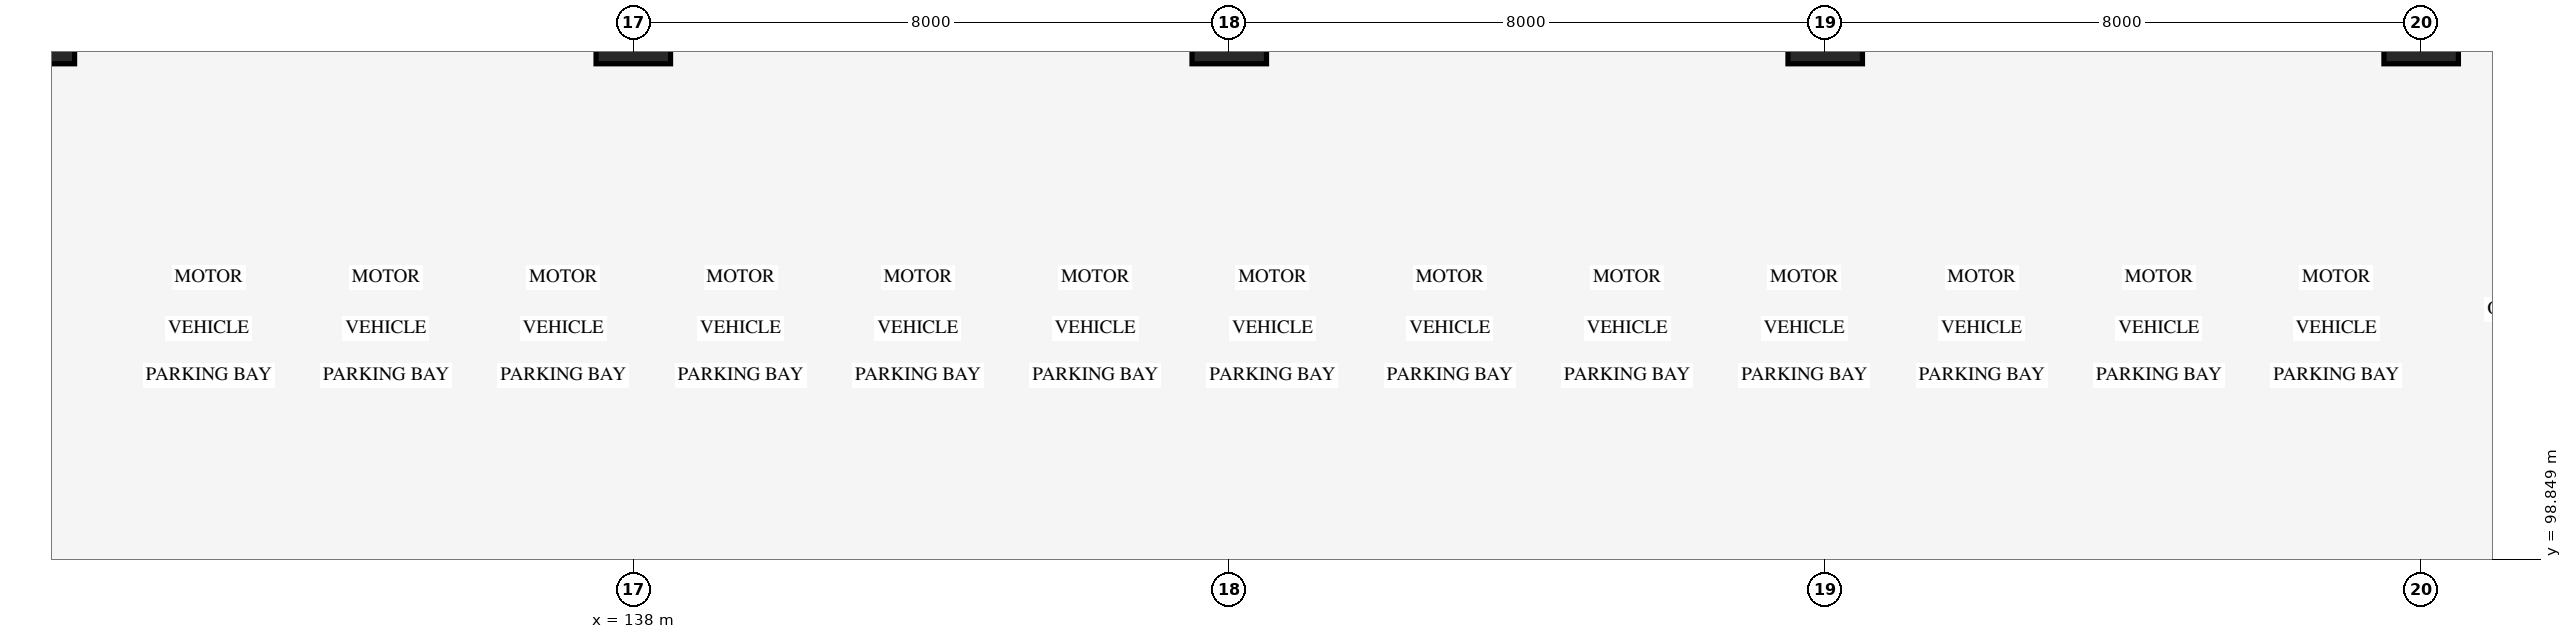
"""IFC4 building model, lengths in metres.
Left out: names, types, materials, properties, quantities, classifications, styles, units other than length and angle.
Written with IfcOpenShell. Run it as: python <this file> out.ifc"""

import sys

from ifc_helpers import new_model, si_unit, direction, frame, origin, origin_2d, place, context, subcontext, project, spatial, rectangle, extrude, element, save


model = new_model("IFC4")
c1 = context("Model", 3, precision=1e-05, world=origin(), true_north=direction((0.0, 1.0)))
c2 = subcontext(c1, "Body", "Model", "MODEL_VIEW")
j1 = project(units=[si_unit("LENGTHUNIT", "METRE"), si_unit("PLANEANGLEUNIT", "RADIAN")], contexts=[c1])
p1 = place(None, origin())
s1 = spatial("IfcSite", under=j1, at=p1, CompositionType="ELEMENT")
p2 = place(p1, origin())
s2 = spatial("IfcBuilding", under=s1, at=p2, CompositionType="ELEMENT")
p3 = place(p2, frame((0.0, 0.0, -9.0)))
s3 = spatial("IfcBuildingStorey", under=s2, at=p3, CompositionType="ELEMENT", Elevation=-9.0)
for number, where, z_axis, x_axis in (
    (1, (130.0, 106.0, 0.0), (0.0, 0.0, 1.0), (1.0, 0.0, 0.0)),
    (2, (138.0, 106.0, 0.0), (0.0, 0.0, 1.0), (1.0, 0.0, 0.0)),
    (3, (146.0, 106.0, 0.0), (0.0, 0.0, 1.0), (1.0, 0.0, 0.0)),
    (4, (154.0, 106.0, 0.0), (0.0, 0.0, 1.0), (1.0, 0.0, 0.0)),
    (5, (162.0, 106.0, 0.0), (0.0, 0.0, 1.0), (1.0, 0.0, 0.0)),
):
    element("IfcColumn", number, at=place(p3, frame(where, z_axis=z_axis, x_axis=x_axis)), inside=s3, PredefinedType="COLUMN", context=c2, shape_type="SweptSolid", body=[
        extrude(rectangle(XDim=1.0, YDim=1.0, at=origin_2d()), origin(), (0.0, 0.0, 1.0), 4.5),
    ])
save(model, sys.argv[1])
